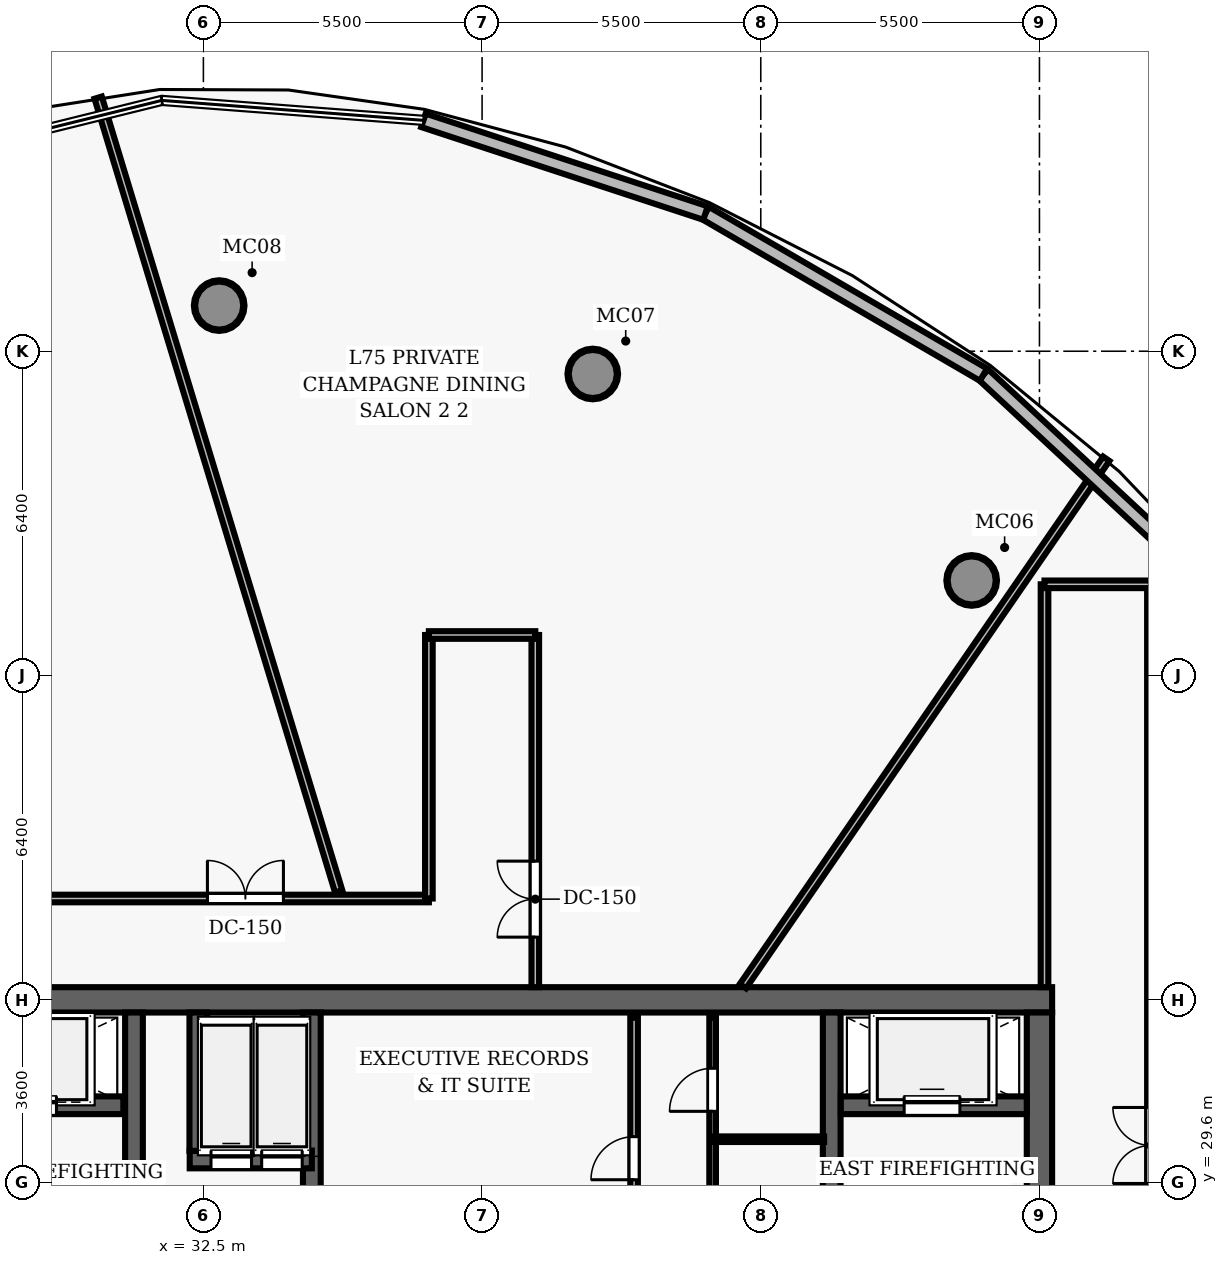
"""IFC4 building model, lengths in metres.
Left out: names, types, materials, properties, quantities, classifications, styles, units other than length and angle.
Written with IfcOpenShell. Run it as: python <this file> out.ifc"""

import sys

from ifc_helpers import new_model, si_unit, direction, frame, frame_2d, origin, origin_2d, place, context, subcontext, project, spatial, rectangle, hollow_circle, extrude, element, fill, save


model = new_model("IFC4")
c1 = context("Model", 3, precision=1e-05, world=origin(), true_north=direction((0.0, 1.0)))
c2 = subcontext(c1, "Body", "Model", "MODEL_VIEW")
j1 = project(units=[si_unit("LENGTHUNIT", "METRE"), si_unit("PLANEANGLEUNIT", "RADIAN")], contexts=[c1])
p1 = place(None, origin())
s1 = spatial("IfcSite", under=j1, at=p1, CompositionType="ELEMENT")
p2 = place(p1, origin())
s2 = spatial("IfcBuilding", under=s1, at=p2, CompositionType="ELEMENT")
p3 = place(p2, frame((0.0, 0.0, 295.95)))
s3 = spatial("IfcBuildingStorey", under=s2, at=p3, CompositionType="ELEMENT", Elevation=295.95)
p4 = place(p3, frame((26.75, 33.2, 0.0), z_axis=(0.0, 0.0, 1.0), x_axis=(1.0, 0.0, 0.0)))
e1 = element("IfcWall", 1, at=p4, inside=s3, PredefinedType="SHEAR", context=c2, shape_type="SweptSolid", body=[
    extrude(rectangle(XDim=22.5, YDim=0.5, at=frame_2d((11.25, 0.0))), origin(), (0.0, 0.0, 1.0), 3.85),
])
p5 = place(p3, frame((49.0, 19.05, 0.0), z_axis=(0.0, 0.0, 1.0), x_axis=(0.0, 1.0, 0.0)))
e2 = element("IfcWall", 2, at=p5, inside=s3, PredefinedType="SHEAR", context=c2, shape_type="SweptSolid", body=[
    extrude(rectangle(XDim=13.9, YDim=0.5, at=frame_2d((6.95, 0.0))), origin(), (0.0, 0.0, 1.0), 3.85),
])
p6 = place(p5, frame((8.2, 0.0, 0.0)))
e3 = element("IfcOpeningElement", 3, at=p6, cuts=e2, PredefinedType="OPENING", context=c2, shape_type="SweptSolid", body=[
    extrude(rectangle(XDim=1.05, YDim=2.15, at=frame_2d((0.525, 1.075))), frame((0.0, 0.26, 0.0), z_axis=(0.0, -1.0, 0.0), x_axis=(1.0, 0.0, 0.0)), (0.0, 0.0, 1.0), 0.52),
])
for number, where, z_axis, x_axis in (
    (4, (31.13, 19.05, 0.0), (0.0, 0.0, 1.0), (0.0, 1.0, 0.0)),
    (5, (44.9, 19.05, 0.0), (0.0, 0.0, 1.0), (0.0, 1.0, 0.0)),
):
    element("IfcWall", number, at=place(p3, frame(where, z_axis=z_axis, x_axis=x_axis)), inside=s3, PredefinedType="SHEAR", context=c2, shape_type="SweptSolid", body=[
        extrude(rectangle(XDim=13.9, YDim=0.35, at=frame_2d((6.95, 0.0))), origin(), (0.0, 0.0, 1.0), 3.85),
    ])
for number, where, z_axis, x_axis in (
    (6, (47.662, 41.477, 0.0), (0.0, 0.0, 1.0), (1.0, 0.0, 0.0)),
    (7, (40.185, 45.551, 0.0), (0.0, 0.0, 1.0), (1.0, 0.0, 0.0)),
    (8, (32.812, 46.901, 0.0), (0.0, 0.0, 1.0), (1.0, 0.0, 0.0)),
):
    element("IfcColumn", number, at=place(p3, frame(where, z_axis=z_axis, x_axis=x_axis)), inside=s3, PredefinedType="COLUMN", context=c2, shape_type="SweptSolid", body=[
        extrude(hollow_circle(Radius=0.5, WallThickness=0.045, at=origin_2d()), origin(), (0.0, 0.0, 1.0), 3.85),
    ])
p7 = place(p3, frame((27.25, 31.12, 0.0), z_axis=(0.0, 0.0, 1.0), x_axis=(1.0, 0.0, 0.0)))
e9 = element("IfcWall", 9, at=p7, inside=s3, PredefinedType="SHEAR", context=c2, shape_type="SweptSolid", body=[
    extrude(rectangle(XDim=3.67, YDim=0.35, at=frame_2d((1.835, 0.0))), origin(), (0.0, 0.0, 1.0), 3.04),
])
p8 = place(p7, frame((1.25, 0.0, 0.0)))
e10 = element("IfcOpeningElement", 10, at=p8, cuts=e9, PredefinedType="OPENING", context=c2, shape_type="SweptSolid", body=[
    extrude(rectangle(XDim=1.1, YDim=2.15, at=frame_2d((0.55, 1.075))), frame((0.0, 0.185, 0.0), z_axis=(0.0, -1.0, 0.0), x_axis=(1.0, 0.0, 0.0)), (0.0, 0.0, 1.0), 0.37),
])
p9 = place(p3, frame((45.08, 31.12, 0.0), z_axis=(0.0, 0.0, 1.0), x_axis=(1.0, 0.0, 0.0)))
e11 = element("IfcWall", 11, at=p9, inside=s3, PredefinedType="SHEAR", context=c2, shape_type="SweptSolid", body=[
    extrude(rectangle(XDim=3.67, YDim=0.35, at=frame_2d((1.835, 0.0))), origin(), (0.0, 0.0, 1.0), 3.04),
])
p10 = place(p9, frame((1.25, 0.0, 0.0)))
e12 = element("IfcOpeningElement", 12, at=p10, cuts=e11, PredefinedType="OPENING", context=c2, shape_type="SweptSolid", body=[
    extrude(rectangle(XDim=1.1, YDim=2.15, at=frame_2d((0.55, 1.075))), frame((0.0, 0.185, 0.0), z_axis=(0.0, -1.0, 0.0), x_axis=(1.0, 0.0, 0.0)), (0.0, 0.0, 1.0), 0.37),
])
p11 = place(p3, frame((34.64, 26.69, 0.0), z_axis=(0.0, 0.0, 1.0), x_axis=(0.0, 1.0, 0.0)))
e13 = element("IfcWall", 13, at=p11, inside=s3, PredefinedType="SHEAR", context=c2, shape_type="SweptSolid", body=[
    extrude(rectangle(XDim=6.26, YDim=0.35, at=frame_2d((3.13, 0.0))), origin(), (0.0, 0.0, 1.0), 3.85),
])
p12 = place(p11, frame((0.85, 0.0, 0.0)))
e14 = element("IfcOpeningElement", 14, at=p12, cuts=e13, PredefinedType="OPENING", context=c2, shape_type="SweptSolid", body=[
    extrude(rectangle(XDim=1.05, YDim=2.15, at=frame_2d((0.525, 1.075))), frame((0.0, 0.185, 0.0), z_axis=(0.0, -1.0, 0.0), x_axis=(1.0, 0.0, 0.0)), (0.0, 0.0, 1.0), 0.37),
])
p13 = place(p3, frame((32.23, 30.05, 0.0), z_axis=(0.0, 0.0, 1.0), x_axis=(1.0, 0.0, 0.0)))
e15 = element("IfcWall", 15, at=p13, inside=s3, PredefinedType="SHEAR", context=c2, shape_type="SweptSolid", body=[
    extrude(rectangle(XDim=2.41, YDim=0.35, at=frame_2d((1.205, 0.0))), origin(), (0.0, 0.0, 1.0), 3.04),
])
p14 = place(p13, frame((0.42, 0.0, 0.0)))
e16 = element("IfcOpeningElement", 16, at=p14, cuts=e15, PredefinedType="OPENING", context=c2, shape_type="SweptSolid", body=[
    extrude(rectangle(XDim=0.8, YDim=2.15, at=frame_2d((0.4, 1.075))), frame((0.0, 0.185, 0.0), z_axis=(0.0, -1.0, 0.0), x_axis=(1.0, 0.0, 0.0)), (0.0, 0.0, 1.0), 0.37),
])
p15 = place(p13, frame((1.42, 0.0, 0.0)))
e17 = element("IfcOpeningElement", 17, at=p15, cuts=e15, PredefinedType="OPENING", context=c2, shape_type="SweptSolid", body=[
    extrude(rectangle(XDim=0.8, YDim=2.15, at=frame_2d((0.4, 1.075))), frame((0.0, 0.185, 0.0), z_axis=(0.0, -1.0, 0.0), x_axis=(1.0, 0.0, 0.0)), (0.0, 0.0, 1.0), 0.37),
])
p16 = place(p3, frame((32.4, 30.22, 0.0), z_axis=(0.0, 0.0, 1.0), x_axis=(0.0, 1.0, 0.0)))
e18 = element("IfcWall", 18, at=p16, inside=s3, PredefinedType="SHEAR", context=c2, shape_type="SweptSolid", body=[
    extrude(rectangle(XDim=2.73, YDim=0.35, at=frame_2d((1.365, 0.0))), origin(), (0.0, 0.0, 1.0), 3.04),
])
p17 = place(p3, frame((41.0, 28.95, 0.0), z_axis=(0.0, 0.0, 1.0), x_axis=(0.0, 1.0, 0.0)))
e19 = element("IfcWall", 19, at=p17, inside=s3, PredefinedType="PARTITIONING", context=c2, shape_type="SweptSolid", body=[
    extrude(rectangle(XDim=3.9, YDim=0.15, at=frame_2d((1.95, 0.0))), origin(), (0.0, 0.0, 1.0), 3.04),
])
p18 = place(p17, frame((0.7, 0.0, 0.0)))
e20 = element("IfcOpeningElement", 20, at=p18, cuts=e19, PredefinedType="OPENING", context=c2, shape_type="SweptSolid", body=[
    extrude(rectangle(XDim=0.85, YDim=2.1, at=frame_2d((0.425, 1.05))), frame((0.0, 0.085, 0.0), z_axis=(0.0, -1.0, 0.0), x_axis=(1.0, 0.0, 0.0)), (0.0, 0.0, 1.0), 0.17),
])
p19 = place(p3, frame((42.55, 28.1, 0.0), z_axis=(0.0, 0.0, 1.0), x_axis=(0.0, 1.0, 0.0)))
e21 = element("IfcWall", 21, at=p19, inside=s3, PredefinedType="PARTITIONING", context=c2, shape_type="SweptSolid", body=[
    extrude(rectangle(XDim=4.75, YDim=0.13, at=frame_2d((2.375, 0.0))), origin(), (0.0, 0.0, 1.0), 3.04),
])
p20 = place(p19, frame((0.55, 0.0, 0.0)))
e22 = element("IfcOpeningElement", 22, at=p20, cuts=e21, PredefinedType="OPENING", context=c2, shape_type="SweptSolid", body=[
    extrude(rectangle(XDim=0.85, YDim=2.1, at=frame_2d((0.425, 1.05))), frame((0.0, 0.075, 0.0), z_axis=(0.0, -1.0, 0.0), x_axis=(1.0, 0.0, 0.0)), (0.0, 0.0, 1.0), 0.15),
])
p21 = place(p19, frame((2.9, 0.0, 0.0)))
e23 = element("IfcOpeningElement", 23, at=p21, cuts=e21, PredefinedType="OPENING", context=c2, shape_type="SweptSolid", body=[
    extrude(rectangle(XDim=0.85, YDim=2.1, at=frame_2d((0.425, 1.05))), frame((0.0, 0.075, 0.0), z_axis=(0.0, -1.0, 0.0), x_axis=(1.0, 0.0, 0.0)), (0.0, 0.0, 1.0), 0.15),
])
p22 = place(p3, frame((42.55, 30.45, 0.0), z_axis=(0.0, 0.0, 1.0), x_axis=(1.0, 0.0, 0.0)))
e24 = element("IfcWall", 24, at=p22, inside=s3, PredefinedType="PARTITIONING", context=c2, shape_type="SweptSolid", body=[
    extrude(rectangle(XDim=2.2, YDim=0.11, at=frame_2d((1.1, 0.0))), origin(), (0.0, 0.0, 1.0), 3.04),
])
p23 = place(p3, frame((26.9, 35.2, 0.0), z_axis=(0.0, 0.0, 1.0), x_axis=(1.0, 0.0, 0.0)))
e25 = element("IfcWall", 25, at=p23, inside=s3, PredefinedType="PARTITIONING", context=c2, shape_type="SweptSolid", body=[
    extrude(rectangle(XDim=10.05, YDim=0.15, at=frame_2d((5.025, 0.0))), origin(), (0.0, 0.0, 1.0), 3.04),
])
p24 = place(p23, frame((5.679, 0.0, 0.0)))
e26 = element("IfcOpeningElement", 26, at=p24, cuts=e25, PredefinedType="OPENING", context=c2, shape_type="SweptSolid", body=[
    extrude(rectangle(XDim=1.5, YDim=2.2, at=frame_2d((0.75, 1.1))), frame((0.0, 0.085, 0.0), z_axis=(0.0, -1.0, 0.0), x_axis=(1.0, 0.0, 0.0)), (0.0, 0.0, 1.0), 0.17),
])
p25 = place(p3, frame((51.2, 10.6, 0.0), z_axis=(0.0, 0.0, 1.0), x_axis=(0.0, 1.0, 0.0)))
e27 = element("IfcWall", 27, at=p25, inside=s3, PredefinedType="PARTITIONING", context=c2, shape_type="SweptSolid", body=[
    extrude(rectangle(XDim=30.8, YDim=0.15, at=frame_2d((15.4, 0.0))), origin(), (0.0, 0.0, 1.0), 3.04),
])
p26 = place(p25, frame((18.976, 0.0, 0.0)))
e28 = element("IfcOpeningElement", 28, at=p26, cuts=e27, PredefinedType="OPENING", context=c2, shape_type="SweptSolid", body=[
    extrude(rectangle(XDim=1.5, YDim=2.2, at=frame_2d((0.75, 1.1))), frame((0.0, 0.085, 0.0), z_axis=(0.0, -1.0, 0.0), x_axis=(1.0, 0.0, 0.0)), (0.0, 0.0, 1.0), 0.17),
])
p27 = place(p25, frame((12.135, 0.0, 0.0)))
e29 = element("IfcOpeningElement", 29, at=p27, cuts=e27, PredefinedType="OPENING", context=c2, shape_type="SweptSolid", body=[
    extrude(rectangle(XDim=0.95, YDim=2.15, at=frame_2d((0.475, 1.075))), frame((0.0, 0.085, 0.0), z_axis=(0.0, -1.0, 0.0), x_axis=(1.0, 0.0, 0.0)), (0.0, 0.0, 1.0), 0.17),
])
p28 = place(p3, frame((49.1, 33.45, 0.0), z_axis=(0.0, 0.0, 1.0), x_axis=(0.0, 1.0, 0.0)))
e30 = element("IfcWall", 30, at=p28, inside=s3, PredefinedType="PARTITIONING", context=c2, shape_type="SweptSolid", body=[
    extrude(rectangle(XDim=7.95, YDim=0.15, at=frame_2d((3.975, 0.0))), origin(), (0.0, 0.0, 1.0), 3.04),
])
p29 = place(p3, frame((49.1, 41.4, 0.0), z_axis=(0.0, 0.0, 1.0), x_axis=(1.0, 0.0, 0.0)))
e31 = element("IfcWall", 31, at=p29, inside=s3, PredefinedType="PARTITIONING", context=c2, shape_type="SweptSolid", body=[
    extrude(rectangle(XDim=2.1, YDim=0.15, at=frame_2d((1.05, 0.0))), origin(), (0.0, 0.0, 1.0), 3.04),
])
p30 = place(p3, frame((36.95, 35.2, 0.0), z_axis=(0.0, 0.0, 1.0), x_axis=(0.0, 1.0, 0.0)))
e32 = element("IfcWall", 32, at=p30, inside=s3, PredefinedType="PARTITIONING", context=c2, shape_type="SweptSolid", body=[
    extrude(rectangle(XDim=5.2, YDim=0.15, at=frame_2d((2.6, 0.0))), origin(), (0.0, 0.0, 1.0), 3.04),
])
p31 = place(p3, frame((39.05, 33.45, 0.0), z_axis=(0.0, 0.0, 1.0), x_axis=(0.0, 1.0, 0.0)))
e33 = element("IfcWall", 33, at=p31, inside=s3, PredefinedType="PARTITIONING", context=c2, shape_type="SweptSolid", body=[
    extrude(rectangle(XDim=6.95, YDim=0.15, at=frame_2d((3.475, 0.0))), origin(), (0.0, 0.0, 1.0), 3.04),
])
p32 = place(p31, frame((0.988, 0.0, 0.0)))
e34 = element("IfcOpeningElement", 34, at=p32, cuts=e33, PredefinedType="OPENING", context=c2, shape_type="SweptSolid", body=[
    extrude(rectangle(XDim=1.5, YDim=2.2, at=frame_2d((0.75, 1.1))), frame((0.0, 0.085, 0.0), z_axis=(0.0, -1.0, 0.0), x_axis=(1.0, 0.0, 0.0)), (0.0, 0.0, 1.0), 0.17),
])
p33 = place(p3, frame((36.95, 40.4, 0.0), z_axis=(0.0, 0.0, 1.0), x_axis=(1.0, 0.0, 0.0)))
e35 = element("IfcWall", 35, at=p33, inside=s3, PredefinedType="PARTITIONING", context=c2, shape_type="SweptSolid", body=[
    extrude(rectangle(XDim=2.1, YDim=0.15, at=frame_2d((1.05, 0.0))), origin(), (0.0, 0.0, 1.0), 3.04),
])
p34 = place(p3, frame((43.148, 33.47, 0.0), z_axis=(0.0, 0.0, 1.0), x_axis=(0.56742778263, 0.823423166725, 0.0)))
e36 = element("IfcWall", 36, at=p34, inside=s3, PredefinedType="PARTITIONING", context=c2, shape_type="SweptSolid", body=[
    extrude(rectangle(XDim=12.639, YDim=0.15, at=frame_2d((6.32, 0.0))), origin(), (0.0, 0.0, 1.0), 3.04),
])
p35 = place(p3, frame((35.17, 35.34, 0.0), z_axis=(0.0, 0.0, 1.0), x_axis=(-0.289993319939, 0.957028669576, 0.0)))
e37 = element("IfcWall", 37, at=p35, inside=s3, PredefinedType="PARTITIONING", context=c2, shape_type="SweptSolid", body=[
    extrude(rectangle(XDim=16.368, YDim=0.15, at=frame_2d((8.184, 0.0))), origin(), (0.0, 0.0, 1.0), 3.04),
])
p36 = place(p3, frame((47.896, 45.538, 0.0), z_axis=(0.0, 0.0, 1.0), x_axis=(0.732033566459, -0.681268564942, 0.0)))
e38 = element("IfcWall", 38, at=p36, inside=s3, PredefinedType="SOLIDWALL", context=c2, shape_type="SweptSolid", body=[
    extrude(rectangle(XDim=6.526, YDim=0.28, at=frame_2d((3.263, 0.0))), origin(), (0.0, 0.0, 1.0), 3.625),
])
p37 = place(p3, frame((42.41, 48.727, 0.0), z_axis=(0.0, 0.0, 1.0), x_axis=(0.864539843758, -0.502564283007, 0.0)))
e39 = element("IfcWall", 39, at=p37, inside=s3, PredefinedType="SOLIDWALL", context=c2, shape_type="SweptSolid", body=[
    extrude(rectangle(XDim=6.345, YDim=0.28, at=frame_2d((3.173, 0.0))), origin(), (0.0, 0.0, 1.0), 3.625),
])
p38 = place(p3, frame((36.843, 50.556, 0.0), z_axis=(0.0, 0.0, 1.0), x_axis=(0.950008094352, -0.312225272304, 0.0)))
e40 = element("IfcWall", 40, at=p38, inside=s3, PredefinedType="SOLIDWALL", context=c2, shape_type="SweptSolid", body=[
    extrude(rectangle(XDim=5.86, YDim=0.28, at=frame_2d((2.93, 0.0))), origin(), (0.0, 0.0, 1.0), 3.625),
])
p39 = place(p18, origin())
e41 = element("IfcDoor", 41, at=p39, inside=s3, OperationType="SINGLE_SWING_LEFT", PredefinedType="DOOR", context=c2, shape_type="SweptSolid", body=[
    extrude(rectangle(XDim=0.85, YDim=2.1, at=frame_2d((0.425, 1.05))), frame((0.0, 0.025, 0.0), z_axis=(0.0, -1.0, 0.0), x_axis=(1.0, 0.0, 0.0)), (0.0, 0.0, 1.0), 0.05),
])
fill(e20, e41)
p40 = place(p21, origin())
e42 = element("IfcDoor", 42, at=p40, inside=s3, OperationType="SINGLE_SWING_LEFT", PredefinedType="DOOR", context=c2, shape_type="SweptSolid", body=[
    extrude(rectangle(XDim=0.85, YDim=2.1, at=frame_2d((0.425, 1.05))), frame((0.0, 0.025, 0.0), z_axis=(0.0, -1.0, 0.0), x_axis=(1.0, 0.0, 0.0)), (0.0, 0.0, 1.0), 0.05),
])
fill(e23, e42)
p41 = place(p32, origin())
e43 = element("IfcDoor", 43, at=p41, inside=s3, OperationType="DOUBLE_DOOR_SINGLE_SWING", PredefinedType="DOOR", context=c2, shape_type="SweptSolid", body=[
    extrude(rectangle(XDim=1.5, YDim=2.2, at=frame_2d((0.75, 1.1))), frame((0.0, 0.025, 0.0), z_axis=(0.0, -1.0, 0.0), x_axis=(1.0, 0.0, 0.0)), (0.0, 0.0, 1.0), 0.05),
])
fill(e34, e43)
p42 = place(p24, origin())
e44 = element("IfcDoor", 44, at=p42, inside=s3, OperationType="DOUBLE_DOOR_SINGLE_SWING", PredefinedType="DOOR", context=c2, shape_type="SweptSolid", body=[
    extrude(rectangle(XDim=1.5, YDim=2.2, at=frame_2d((0.75, 1.1))), frame((0.0, 0.025, 0.0), z_axis=(0.0, -1.0, 0.0), x_axis=(1.0, 0.0, 0.0)), (0.0, 0.0, 1.0), 0.05),
])
fill(e26, e44)
p43 = place(p8, origin())
e45 = element("IfcDoor", 45, at=p43, inside=s3, OperationType="SLIDING_TO_LEFT", PredefinedType="DOOR", context=c2, shape_type="SweptSolid", body=[
    extrude(rectangle(XDim=1.1, YDim=2.15, at=frame_2d((0.55, 1.075))), frame((0.0, 0.025, 0.0), z_axis=(0.0, -1.0, 0.0), x_axis=(1.0, 0.0, 0.0)), (0.0, 0.0, 1.0), 0.05),
])
fill(e10, e45)
p44 = place(p10, origin())
e46 = element("IfcDoor", 46, at=p44, inside=s3, OperationType="SLIDING_TO_LEFT", PredefinedType="DOOR", context=c2, shape_type="SweptSolid", body=[
    extrude(rectangle(XDim=1.1, YDim=2.15, at=frame_2d((0.55, 1.075))), frame((0.0, 0.025, 0.0), z_axis=(0.0, -1.0, 0.0), x_axis=(1.0, 0.0, 0.0)), (0.0, 0.0, 1.0), 0.05),
])
fill(e12, e46)
p45 = place(p14, origin())
e47 = element("IfcDoor", 47, at=p45, inside=s3, OperationType="SLIDING_TO_LEFT", PredefinedType="DOOR", context=c2, shape_type="SweptSolid", body=[
    extrude(rectangle(XDim=0.8, YDim=2.15, at=frame_2d((0.4, 1.075))), frame((0.0, 0.025, 0.0), z_axis=(0.0, -1.0, 0.0), x_axis=(1.0, 0.0, 0.0)), (0.0, 0.0, 1.0), 0.05),
])
fill(e16, e47)
p46 = place(p15, origin())
e48 = element("IfcDoor", 48, at=p46, inside=s3, OperationType="SLIDING_TO_LEFT", PredefinedType="DOOR", context=c2, shape_type="SweptSolid", body=[
    extrude(rectangle(XDim=0.8, YDim=2.15, at=frame_2d((0.4, 1.075))), frame((0.0, 0.025, 0.0), z_axis=(0.0, -1.0, 0.0), x_axis=(1.0, 0.0, 0.0)), (0.0, 0.0, 1.0), 0.05),
])
fill(e17, e48)
save(model, sys.argv[1])
